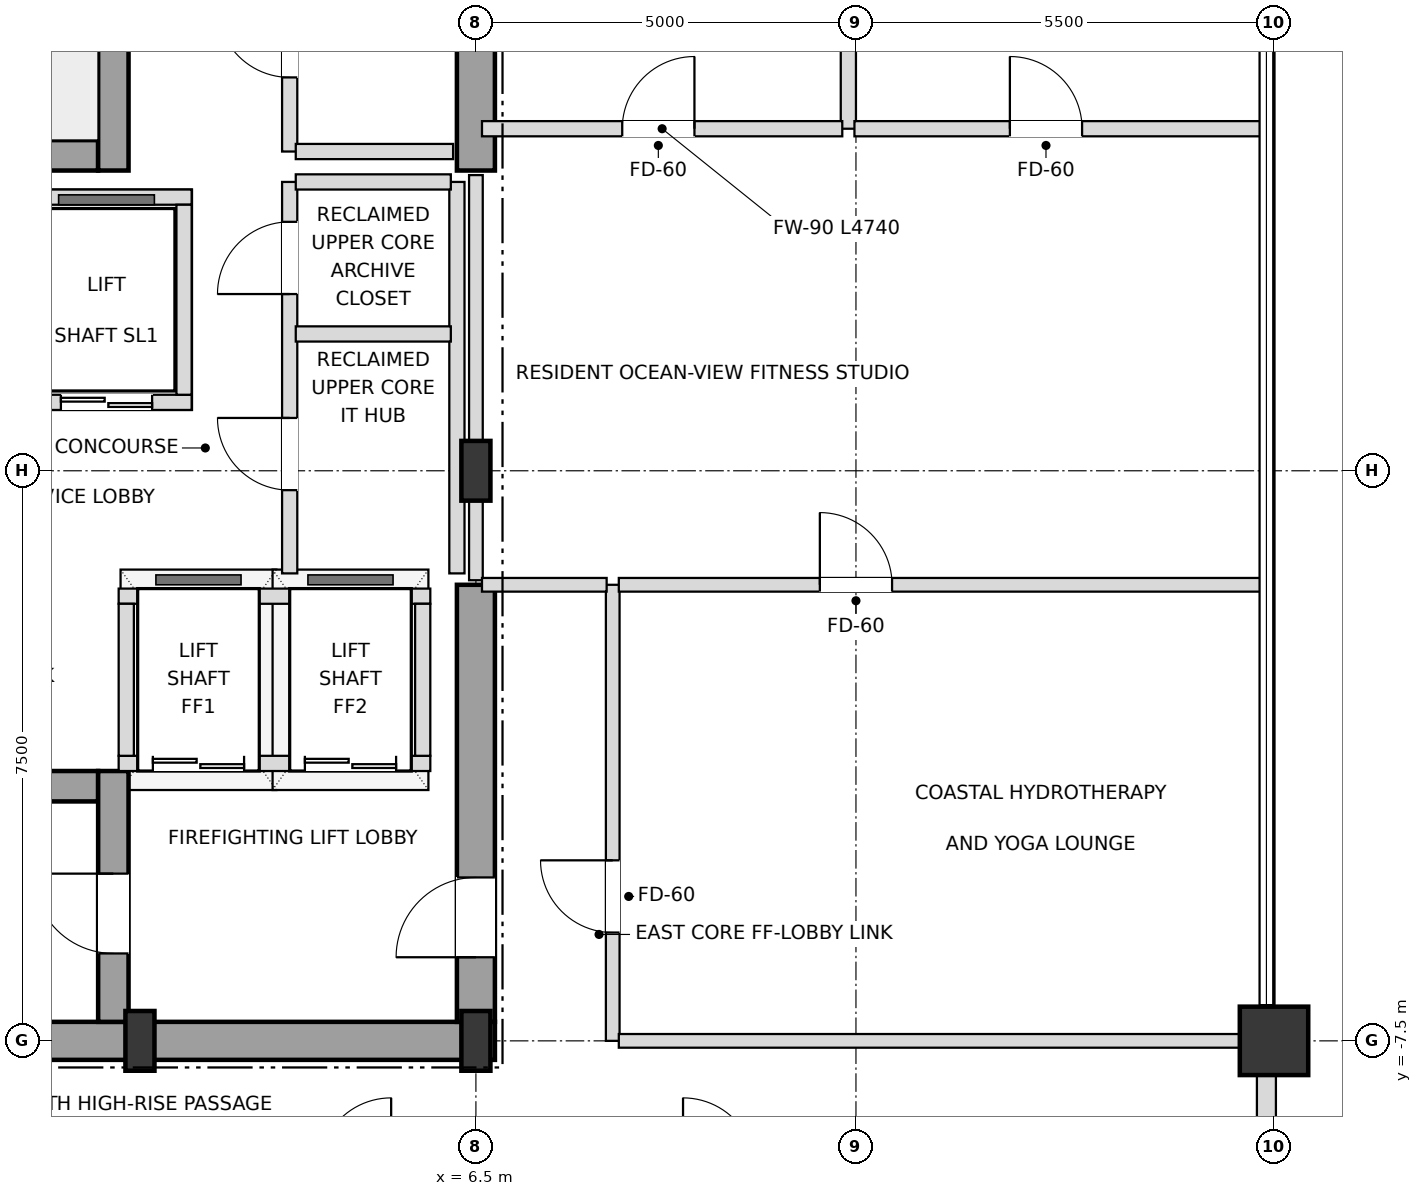
"""IFC4 building model, lengths in metres.
Left out: names, types, materials, properties, quantities, classifications, styles, units other than length and angle.
Written with IfcOpenShell. Run it as: python <this file> out.ifc"""

import sys

from ifc_helpers import new_model, si_unit, direction, frame, frame_2d, origin, origin_2d, place, context, subcontext, project, spatial, rectangle, i_section, extrude, element, fill, save


model = new_model("IFC4")
c1 = context("Model", 3, precision=1e-05, world=origin(), true_north=direction((0.0, 1.0)))
c2 = subcontext(c1, "Body", "Model", "MODEL_VIEW")
j1 = project(units=[si_unit("LENGTHUNIT", "METRE"), si_unit("PLANEANGLEUNIT", "RADIAN")], contexts=[c1])
p1 = place(None, origin())
s1 = spatial("IfcSite", under=j1, at=p1, CompositionType="ELEMENT")
p2 = place(p1, origin())
s2 = spatial("IfcBuilding", under=s1, at=p2, CompositionType="ELEMENT")
p3 = place(p2, frame((0.0, 0.0, 258.3)))
s3 = spatial("IfcBuildingStorey", under=s2, at=p3, CompositionType="ELEMENT", Elevation=258.3)
for number, where, z_axis, x_axis in (
    (1, (2.08, -7.5, 0.0), (0.0, 0.0, 1.0), (1.0, 0.0, 0.0)),
    (2, (6.5, -7.5, 0.0), (0.0, 0.0, 1.0), (1.0, 0.0, 0.0)),
    (3, (6.5, 0.0, 0.0), (0.0, 0.0, 1.0), (1.0, 0.0, 0.0)),
):
    element("IfcColumn", number, at=place(p3, frame(where, z_axis=z_axis, x_axis=x_axis)), inside=s3, PredefinedType="COLUMN", context=c2, shape_type="SweptSolid", body=[
        extrude(i_section(OverallWidth=0.382, OverallDepth=0.786, WebThickness=0.02, FlangeThickness=0.033, at=origin_2d()), origin(), (0.0, 0.0, 1.0), 3.6),
    ])
p4 = place(p3, frame((17.0, -7.5, 0.0), z_axis=(0.0, 0.0, 1.0), x_axis=(1.0, 0.0, 0.0)))
e4 = element("IfcColumn", 4, at=p4, inside=s3, PredefinedType="USERDEFINED", context=c2, shape_type="SweptSolid", body=[
    extrude(rectangle(XDim=0.9, YDim=0.9, at=origin_2d()), origin(), (0.0, 0.0, 1.0), 3.6),
])
p5 = place(p3, frame((16.9, -12.555, 0.0), z_axis=(0.0, 0.0, 1.0), x_axis=(0.0, 1.0, 0.0)))
e5 = element("IfcWall", 5, at=p5, inside=s3, PredefinedType="SOLIDWALL", context=c2, shape_type="SweptSolid", body=[
    extrude(rectangle(XDim=4.61, YDim=0.25, at=frame_2d((2.305, 0.0))), origin(), (0.0, 0.0, 1.0), 2.748),
])
p6 = place(p5, frame((1.405, 0.0, 0.72)))
e6 = element("IfcOpeningElement", 6, at=p6, cuts=e5, PredefinedType="OPENING", context=c2, shape_type="SweptSolid", body=[
    extrude(rectangle(XDim=1.8, YDim=1.68, at=frame_2d((0.9, 0.84))), frame((0.0, 0.135, 0.0), z_axis=(0.0, -1.0, 0.0), x_axis=(1.0, 0.0, 0.0)), (0.0, 0.0, 1.0), 0.27),
])
p7 = place(p3, frame((0.0, -7.5, 0.0), z_axis=(0.0, 0.0, 1.0), x_axis=(1.0, 0.0, 0.0)))
e7 = element("IfcWall", 7, at=p7, inside=s3, PredefinedType="SHEAR", context=c2, shape_type="SweptSolid", body=[
    extrude(rectangle(XDim=6.75, YDim=0.5, at=frame_2d((3.375, 0.0))), origin(), (0.0, 0.0, 1.0), 3.38),
])
p8 = place(p3, frame((6.5, -7.25, 0.0), z_axis=(0.0, 0.0, 1.0), x_axis=(0.0, 1.0, 0.0)))
e8 = element("IfcWall", 8, at=p8, inside=s3, PredefinedType="SHEAR", context=c2, shape_type="SweptSolid", body=[
    extrude(rectangle(XDim=5.75, YDim=0.5, at=frame_2d((2.875, 0.0))), origin(), (0.0, 0.0, 1.0), 3.38),
])
p9 = place(p8, frame((0.85, 0.0, 0.0)))
e9 = element("IfcOpeningElement", 9, at=p9, cuts=e8, PredefinedType="OPENING", context=c2, shape_type="SweptSolid", body=[
    extrude(rectangle(XDim=1.05, YDim=2.15, at=frame_2d((0.525, 1.075))), frame((0.0, 0.26, 0.0), z_axis=(0.0, -1.0, 0.0), x_axis=(1.0, 0.0, 0.0)), (0.0, 0.0, 1.0), 0.52),
])
p10 = place(p3, frame((6.5, 3.95, 0.0), z_axis=(0.0, 0.0, 1.0), x_axis=(0.0, 1.0, 0.0)))
e10 = element("IfcWall", 10, at=p10, inside=s3, PredefinedType="SHEAR", context=c2, shape_type="SweptSolid", body=[
    extrude(rectangle(XDim=3.3, YDim=0.5, at=frame_2d((1.65, 0.0))), origin(), (0.0, 0.0, 1.0), 3.38),
])
p11 = place(p3, frame((-6.25, -4.15, 0.0), z_axis=(0.0, 0.0, 1.0), x_axis=(1.0, 0.0, 0.0)))
e11 = element("IfcWall", 11, at=p11, inside=s3, PredefinedType="SHEAR", context=c2, shape_type="SweptSolid", body=[
    extrude(rectangle(XDim=7.78, YDim=0.4, at=frame_2d((3.89, 0.0))), origin(), (0.0, 0.0, 1.0), 3.38),
])
p12 = place(p3, frame((1.73, -7.25, 0.0), z_axis=(0.0, 0.0, 1.0), x_axis=(0.0, 1.0, 0.0)))
e12 = element("IfcWall", 12, at=p12, inside=s3, PredefinedType="SHEAR", context=c2, shape_type="SweptSolid", body=[
    extrude(rectangle(XDim=3.3, YDim=0.4, at=frame_2d((1.65, 0.0))), origin(), (0.0, 0.0, 1.0), 3.38),
])
p13 = place(p12, frame((0.9, 0.0, 0.0)))
e13 = element("IfcOpeningElement", 13, at=p13, cuts=e12, PredefinedType="OPENING", context=c2, shape_type="SweptSolid", body=[
    extrude(rectangle(XDim=1.05, YDim=2.15, at=frame_2d((0.525, 1.075))), frame((0.0, 0.21, 0.0), z_axis=(0.0, -1.0, 0.0), x_axis=(1.0, 0.0, 0.0)), (0.0, 0.0, 1.0), 0.42),
])
p14 = place(p3, frame((-5.55, 4.15, 0.0), z_axis=(0.0, 0.0, 1.0), x_axis=(1.0, 0.0, 0.0)))
e14 = element("IfcWall", 14, at=p14, inside=s3, PredefinedType="SHEAR", context=c2, shape_type="SweptSolid", body=[
    extrude(rectangle(XDim=7.08, YDim=0.4, at=frame_2d((3.54, 0.0))), origin(), (0.0, 0.0, 1.0), 3.38),
])
p15 = place(p3, frame((1.73, 3.95, 0.0), z_axis=(0.0, 0.0, 1.0), x_axis=(0.0, 1.0, 0.0)))
e15 = element("IfcWall", 15, at=p15, inside=s3, PredefinedType="SHEAR", context=c2, shape_type="SweptSolid", body=[
    extrude(rectangle(XDim=3.3, YDim=0.4, at=frame_2d((1.65, 0.0))), origin(), (0.0, 0.0, 1.0), 3.38),
])
p16 = place(p3, frame((-2.82, 0.9, 0.0), z_axis=(0.0, 0.0, 1.0), x_axis=(1.0, 0.0, 0.0)))
e16 = element("IfcWall", 16, at=p16, inside=s3, PredefinedType="SOLIDWALL", context=c2, shape_type="SweptSolid", body=[
    extrude(rectangle(XDim=5.58, YDim=0.2, at=frame_2d((2.79, 0.0))), origin(), (0.0, 0.0, 1.0), 3.38),
])
p17 = place(p16, frame((0.49, 0.0, 0.0)))
e17 = element("IfcOpeningElement", 17, at=p17, cuts=e16, PredefinedType="OPENING", context=c2, shape_type="SweptSolid", body=[
    extrude(rectangle(XDim=1.1, YDim=2.15, at=frame_2d((0.55, 1.075))), frame((0.0, 0.11, 0.0), z_axis=(0.0, -1.0, 0.0), x_axis=(1.0, 0.0, 0.0)), (0.0, 0.0, 1.0), 0.22),
])
p18 = place(p16, frame((2.17, 0.0, 0.0)))
e18 = element("IfcOpeningElement", 18, at=p18, cuts=e16, PredefinedType="OPENING", context=c2, shape_type="SweptSolid", body=[
    extrude(rectangle(XDim=1.1, YDim=2.15, at=frame_2d((0.55, 1.075))), frame((0.0, 0.11, 0.0), z_axis=(0.0, -1.0, 0.0), x_axis=(1.0, 0.0, 0.0)), (0.0, 0.0, 1.0), 0.22),
])
p19 = place(p16, frame((3.86, 0.0, 0.0)))
e19 = element("IfcOpeningElement", 19, at=p19, cuts=e16, PredefinedType="OPENING", context=c2, shape_type="SweptSolid", body=[
    extrude(rectangle(XDim=1.2, YDim=2.2, at=frame_2d((0.6, 1.1))), frame((0.0, 0.11, 0.0), z_axis=(0.0, -1.0, 0.0), x_axis=(1.0, 0.0, 0.0)), (0.0, 0.0, 1.0), 0.22),
])
p20 = place(p3, frame((-2.82, 3.6, 0.0), z_axis=(0.0, 0.0, 1.0), x_axis=(1.0, 0.0, 0.0)))
e20 = element("IfcWall", 20, at=p20, inside=s3, PredefinedType="SOLIDWALL", context=c2, shape_type="SweptSolid", body=[
    extrude(rectangle(XDim=5.58, YDim=0.2, at=frame_2d((2.79, 0.0))), origin(), (0.0, 0.0, 1.0), 3.38),
])
p21 = place(p3, frame((2.66, 1.0, 0.0), z_axis=(0.0, 0.0, 1.0), x_axis=(0.0, 1.0, 0.0)))
e21 = element("IfcWall", 21, at=p21, inside=s3, PredefinedType="SOLIDWALL", context=c2, shape_type="SweptSolid", body=[
    extrude(rectangle(XDim=2.5, YDim=0.2, at=frame_2d((1.25, 0.0))), origin(), (0.0, 0.0, 1.0), 3.38),
])
p22 = place(p3, frame((1.8, -3.85, 0.0), z_axis=(0.0, 0.0, 1.0), x_axis=(1.0, 0.0, 0.0)))
e22 = element("IfcWall", 22, at=p22, inside=s3, PredefinedType="SOLIDWALL", context=c2, shape_type="SweptSolid", body=[
    extrude(rectangle(XDim=4.1, YDim=0.2, at=frame_2d((2.05, 0.0))), origin(), (0.0, 0.0, 1.0), 3.38),
])
p23 = place(p22, frame((0.45, 0.0, 0.0)))
e23 = element("IfcOpeningElement", 23, at=p23, cuts=e22, PredefinedType="OPENING", context=c2, shape_type="SweptSolid", body=[
    extrude(rectangle(XDim=1.2, YDim=2.2, at=frame_2d((0.6, 1.1))), frame((0.0, 0.11, 0.0), z_axis=(0.0, -1.0, 0.0), x_axis=(1.0, 0.0, 0.0)), (0.0, 0.0, 1.0), 0.22),
])
p24 = place(p22, frame((2.45, 0.0, 0.0)))
e24 = element("IfcOpeningElement", 24, at=p24, cuts=e22, PredefinedType="OPENING", context=c2, shape_type="SweptSolid", body=[
    extrude(rectangle(XDim=1.2, YDim=2.2, at=frame_2d((0.6, 1.1))), frame((0.0, 0.11, 0.0), z_axis=(0.0, -1.0, 0.0), x_axis=(1.0, 0.0, 0.0)), (0.0, 0.0, 1.0), 0.22),
])
p25 = place(p3, frame((1.8, -1.65, 0.0), z_axis=(0.0, 0.0, 1.0), x_axis=(1.0, 0.0, 0.0)))
e25 = element("IfcWall", 25, at=p25, inside=s3, PredefinedType="SOLIDWALL", context=c2, shape_type="SweptSolid", body=[
    extrude(rectangle(XDim=4.1, YDim=0.2, at=frame_2d((2.05, 0.0))), origin(), (0.0, 0.0, 1.0), 3.38),
])
for number, where, z_axis, x_axis in (
    (26, (1.9, -3.75, 0.0), (0.0, 0.0, 1.0), (0.0, 1.0, 0.0)),
    (27, (5.8, -3.75, 0.0), (0.0, 0.0, 1.0), (0.0, 1.0, 0.0)),
):
    element("IfcWall", number, at=place(p3, frame(where, z_axis=z_axis, x_axis=x_axis)), inside=s3, PredefinedType="SOLIDWALL", context=c2, shape_type="SweptSolid", body=[
        extrude(rectangle(XDim=2.0, YDim=0.2, at=frame_2d((1.0, 0.0))), origin(), (0.0, 0.0, 1.0), 3.38),
    ])
p26 = place(p3, frame((4.05, -1.35, 0.0), z_axis=(0.0, 0.0, 1.0), x_axis=(0.0, 1.0, 0.0)))
e28 = element("IfcWall", 28, at=p26, inside=s3, PredefinedType="SOLIDWALL", context=c2, shape_type="SweptSolid", body=[
    extrude(rectangle(XDim=5.15, YDim=0.2, at=frame_2d((2.575, 0.0))), origin(), (0.0, 0.0, 1.0), 3.38),
])
p27 = place(p26, frame((1.095, 0.0, 0.0)))
e29 = element("IfcOpeningElement", 29, at=p27, cuts=e28, PredefinedType="OPENING", context=c2, shape_type="SweptSolid", body=[
    extrude(rectangle(XDim=0.95, YDim=2.15, at=frame_2d((0.475, 1.075))), frame((0.0, 0.11, 0.0), z_axis=(0.0, -1.0, 0.0), x_axis=(1.0, 0.0, 0.0)), (0.0, 0.0, 1.0), 0.22),
])
p28 = place(p26, frame((3.675, 0.0, 0.0)))
e30 = element("IfcOpeningElement", 30, at=p28, cuts=e28, PredefinedType="OPENING", context=c2, shape_type="SweptSolid", body=[
    extrude(rectangle(XDim=0.95, YDim=2.15, at=frame_2d((0.475, 1.075))), frame((0.0, 0.11, 0.0), z_axis=(0.0, -1.0, 0.0), x_axis=(1.0, 0.0, 0.0)), (0.0, 0.0, 1.0), 0.22),
])
p29 = place(p3, frame((4.05, 4.2, 0.0), z_axis=(0.0, 0.0, 1.0), x_axis=(0.0, 1.0, 0.0)))
e31 = element("IfcWall", 31, at=p29, inside=s3, PredefinedType="SOLIDWALL", context=c2, shape_type="SweptSolid", body=[
    extrude(rectangle(XDim=3.05, YDim=0.2, at=frame_2d((1.525, 0.0))), origin(), (0.0, 0.0, 1.0), 3.38),
])
p30 = place(p29, frame((0.975, 0.0, 0.0)))
e32 = element("IfcOpeningElement", 32, at=p30, cuts=e31, PredefinedType="OPENING", context=c2, shape_type="SweptSolid", body=[
    extrude(rectangle(XDim=0.95, YDim=2.15, at=frame_2d((0.475, 1.075))), frame((0.0, 0.11, 0.0), z_axis=(0.0, -1.0, 0.0), x_axis=(1.0, 0.0, 0.0)), (0.0, 0.0, 1.0), 0.22),
])
p31 = place(p3, frame((6.25, -1.35, 0.0), z_axis=(0.0, 0.0, 1.0), x_axis=(0.0, 1.0, 0.0)))
e33 = element("IfcWall", 33, at=p31, inside=s3, PredefinedType="SOLIDWALL", context=c2, shape_type="SweptSolid", body=[
    extrude(rectangle(XDim=5.15, YDim=0.2, at=frame_2d((2.575, 0.0))), origin(), (0.0, 0.0, 1.0), 3.38),
])
p32 = place(p3, frame((6.5, -1.44, 0.0), z_axis=(0.0, 0.0, 1.0), x_axis=(0.0, 1.0, 0.0)))
e34 = element("IfcWall", 34, at=p32, inside=s3, PredefinedType="PARTITIONING", context=c2, shape_type="SweptSolid", body=[
    extrude(rectangle(XDim=5.33, YDim=0.18, at=frame_2d((2.665, 0.0))), origin(), (0.0, 0.0, 1.0), 2.826),
])
p33 = place(p3, frame((8.3, -7.5, 0.0), z_axis=(0.0, 0.0, 1.0), x_axis=(0.0, 1.0, 0.0)))
e35 = element("IfcWall", 35, at=p33, inside=s3, PredefinedType="PARTITIONING", context=c2, shape_type="SweptSolid", body=[
    extrude(rectangle(XDim=6.0, YDim=0.18, at=frame_2d((3.0, 0.0))), origin(), (0.0, 0.0, 1.0), 3.38),
])
p34 = place(p33, frame((1.425, 0.0, 0.0)))
e36 = element("IfcOpeningElement", 36, at=p34, cuts=e35, PredefinedType="OPENING", context=c2, shape_type="SweptSolid", body=[
    extrude(rectangle(XDim=0.95, YDim=2.15, at=frame_2d((0.475, 1.075))), frame((0.0, 0.1, 0.0), z_axis=(0.0, -1.0, 0.0), x_axis=(1.0, 0.0, 0.0)), (0.0, 0.0, 1.0), 0.2),
])
p35 = place(p3, frame((11.4, 4.5, 0.0), z_axis=(0.0, 0.0, 1.0), x_axis=(0.0, 1.0, 0.0)))
e37 = element("IfcWall", 37, at=p35, inside=s3, PredefinedType="SOLIDWALL", context=c2, shape_type="SweptSolid", body=[
    extrude(rectangle(XDim=3.0, YDim=0.2, at=frame_2d((1.5, 0.0))), origin(), (0.0, 0.0, 1.0), 3.018),
])
p36 = place(p3, frame((8.38, -7.5, 0.0), z_axis=(0.0, 0.0, 1.0), x_axis=(1.0, 0.0, 0.0)))
e38 = element("IfcWall", 38, at=p36, inside=s3, PredefinedType="PARTITIONING", context=c2, shape_type="SweptSolid", body=[
    extrude(rectangle(XDim=8.52, YDim=0.18, at=frame_2d((4.26, 0.0))), origin(), (0.0, 0.0, 1.0), 2.826),
])
p37 = place(p3, frame((6.58, -1.5, 0.0), z_axis=(0.0, 0.0, 1.0), x_axis=(1.0, 0.0, 0.0)))
e39 = element("IfcWall", 39, at=p37, inside=s3, PredefinedType="PARTITIONING", context=c2, shape_type="SweptSolid", body=[
    extrude(rectangle(XDim=1.64, YDim=0.18, at=frame_2d((0.82, 0.0))), origin(), (0.0, 0.0, 1.0), 3.38),
])
p38 = place(p3, frame((8.38, -1.5, 0.0), z_axis=(0.0, 0.0, 1.0), x_axis=(1.0, 0.0, 0.0)))
e40 = element("IfcWall", 40, at=p38, inside=s3, PredefinedType="PARTITIONING", context=c2, shape_type="SweptSolid", body=[
    extrude(rectangle(XDim=8.44, YDim=0.18, at=frame_2d((4.22, 0.0))), origin(), (0.0, 0.0, 1.0), 3.018),
])
p39 = place(p38, frame((2.645, 0.0, 0.0)))
e41 = element("IfcOpeningElement", 41, at=p39, cuts=e40, PredefinedType="OPENING", context=c2, shape_type="SweptSolid", body=[
    extrude(rectangle(XDim=0.95, YDim=2.15, at=frame_2d((0.475, 1.075))), frame((0.0, 0.1, 0.0), z_axis=(0.0, -1.0, 0.0), x_axis=(1.0, 0.0, 0.0)), (0.0, 0.0, 1.0), 0.2),
])
for number, where, z_axis, x_axis in (
    (42, (4.13, 1.8, 0.0), (0.0, 0.0, 1.0), (1.0, 0.0, 0.0)),
    (43, (4.13, 3.8, 0.0), (0.0, 0.0, 1.0), (1.0, 0.0, 0.0)),
):
    element("IfcWall", number, at=place(p3, frame(where, z_axis=z_axis, x_axis=x_axis)), inside=s3, PredefinedType="SOLIDWALL", context=c2, shape_type="SweptSolid", body=[
        extrude(rectangle(XDim=2.04, YDim=0.2, at=frame_2d((1.02, 0.0))), origin(), (0.0, 0.0, 1.0), 3.38),
    ])
p40 = place(p3, frame((4.13, 4.2, 0.0), z_axis=(0.0, 0.0, 1.0), x_axis=(1.0, 0.0, 0.0)))
e44 = element("IfcWall", 44, at=p40, inside=s3, PredefinedType="SOLIDWALL", context=c2, shape_type="SweptSolid", body=[
    extrude(rectangle(XDim=2.07, YDim=0.2, at=frame_2d((1.035, 0.0))), origin(), (0.0, 0.0, 1.0), 3.38),
])
p41 = place(p3, frame((6.58, 4.5, 0.0), z_axis=(0.0, 0.0, 1.0), x_axis=(1.0, 0.0, 0.0)))
e45 = element("IfcWall", 45, at=p41, inside=s3, PredefinedType="SOLIDWALL", context=c2, shape_type="SweptSolid", body=[
    extrude(rectangle(XDim=4.74, YDim=0.2, at=frame_2d((2.37, 0.0))), origin(), (0.0, 0.0, 1.0), 3.38),
])
p42 = place(p41, frame((1.845, 0.0, 0.0)))
e46 = element("IfcOpeningElement", 46, at=p42, cuts=e45, PredefinedType="OPENING", context=c2, shape_type="SweptSolid", body=[
    extrude(rectangle(XDim=0.95, YDim=2.15, at=frame_2d((0.475, 1.075))), frame((0.0, 0.11, 0.0), z_axis=(0.0, -1.0, 0.0), x_axis=(1.0, 0.0, 0.0)), (0.0, 0.0, 1.0), 0.22),
])
p43 = place(p3, frame((11.48, 4.5, 0.0), z_axis=(0.0, 0.0, 1.0), x_axis=(1.0, 0.0, 0.0)))
e47 = element("IfcWall", 47, at=p43, inside=s3, PredefinedType="SOLIDWALL", context=c2, shape_type="SweptSolid", body=[
    extrude(rectangle(XDim=5.34, YDim=0.2, at=frame_2d((2.67, 0.0))), origin(), (0.0, 0.0, 1.0), 3.38),
])
p44 = place(p43, frame((2.045, 0.0, 0.0)))
e48 = element("IfcOpeningElement", 48, at=p44, cuts=e47, PredefinedType="OPENING", context=c2, shape_type="SweptSolid", body=[
    extrude(rectangle(XDim=0.95, YDim=2.15, at=frame_2d((0.475, 1.075))), frame((0.0, 0.11, 0.0), z_axis=(0.0, -1.0, 0.0), x_axis=(1.0, 0.0, 0.0)), (0.0, 0.0, 1.0), 0.22),
])
p45 = place(p9, origin())
e49 = element("IfcDoor", 49, at=p45, inside=s3, OperationType="SINGLE_SWING_LEFT", PredefinedType="DOOR", context=c2, shape_type="SweptSolid", body=[
    extrude(rectangle(XDim=1.05, YDim=2.15, at=frame_2d((0.525, 1.075))), frame((0.0, 0.025, 0.0), z_axis=(0.0, -1.0, 0.0), x_axis=(1.0, 0.0, 0.0)), (0.0, 0.0, 1.0), 0.05),
])
fill(e9, e49)
p46 = place(p13, origin())
e50 = element("IfcDoor", 50, at=p46, inside=s3, OperationType="SINGLE_SWING_RIGHT", PredefinedType="DOOR", context=c2, shape_type="SweptSolid", body=[
    extrude(rectangle(XDim=1.05, YDim=2.15, at=frame_2d((0.525, 1.075))), frame((0.0, 0.025, 0.0), z_axis=(0.0, -1.0, 0.0), x_axis=(1.0, 0.0, 0.0)), (0.0, 0.0, 1.0), 0.05),
])
fill(e13, e50)
p47 = place(p19, origin())
e51 = element("IfcDoor", 51, at=p47, inside=s3, OperationType="DOUBLE_DOOR_SLIDING", PredefinedType="DOOR", context=c2, shape_type="SweptSolid", body=[
    extrude(rectangle(XDim=1.2, YDim=2.2, at=frame_2d((0.6, 1.1))), frame((0.0, 0.025, 0.0), z_axis=(0.0, -1.0, 0.0), x_axis=(1.0, 0.0, 0.0)), (0.0, 0.0, 1.0), 0.05),
])
fill(e19, e51)
p48 = place(p23, origin())
e52 = element("IfcDoor", 52, at=p48, inside=s3, OperationType="DOUBLE_DOOR_SLIDING", PredefinedType="DOOR", context=c2, shape_type="SweptSolid", body=[
    extrude(rectangle(XDim=1.2, YDim=2.2, at=frame_2d((0.6, 1.1))), frame((0.0, 0.025, 0.0), z_axis=(0.0, -1.0, 0.0), x_axis=(1.0, 0.0, 0.0)), (0.0, 0.0, 1.0), 0.05),
])
fill(e23, e52)
p49 = place(p24, origin())
e53 = element("IfcDoor", 53, at=p49, inside=s3, OperationType="DOUBLE_DOOR_SLIDING", PredefinedType="DOOR", context=c2, shape_type="SweptSolid", body=[
    extrude(rectangle(XDim=1.2, YDim=2.2, at=frame_2d((0.6, 1.1))), frame((0.0, 0.025, 0.0), z_axis=(0.0, -1.0, 0.0), x_axis=(1.0, 0.0, 0.0)), (0.0, 0.0, 1.0), 0.05),
])
fill(e24, e53)
p50 = place(p27, origin())
e54 = element("IfcDoor", 54, at=p50, inside=s3, OperationType="SINGLE_SWING_RIGHT", PredefinedType="DOOR", context=c2, shape_type="SweptSolid", body=[
    extrude(rectangle(XDim=0.95, YDim=2.15, at=frame_2d((0.475, 1.075))), frame((0.0, 0.025, 0.0), z_axis=(0.0, -1.0, 0.0), x_axis=(1.0, 0.0, 0.0)), (0.0, 0.0, 1.0), 0.05),
])
fill(e29, e54)
p51 = place(p28, origin())
e55 = element("IfcDoor", 55, at=p51, inside=s3, OperationType="SINGLE_SWING_LEFT", PredefinedType="DOOR", context=c2, shape_type="SweptSolid", body=[
    extrude(rectangle(XDim=0.95, YDim=2.15, at=frame_2d((0.475, 1.075))), frame((0.0, 0.025, 0.0), z_axis=(0.0, -1.0, 0.0), x_axis=(1.0, 0.0, 0.0)), (0.0, 0.0, 1.0), 0.05),
])
fill(e30, e55)
p52 = place(p30, origin())
e56 = element("IfcDoor", 56, at=p52, inside=s3, OperationType="SINGLE_SWING_RIGHT", PredefinedType="DOOR", context=c2, shape_type="SweptSolid", body=[
    extrude(rectangle(XDim=0.95, YDim=2.15, at=frame_2d((0.475, 1.075))), frame((0.0, 0.025, 0.0), z_axis=(0.0, -1.0, 0.0), x_axis=(1.0, 0.0, 0.0)), (0.0, 0.0, 1.0), 0.05),
])
fill(e32, e56)
p53 = place(p34, origin())
e57 = element("IfcDoor", 57, at=p53, inside=s3, OperationType="SINGLE_SWING_RIGHT", PredefinedType="DOOR", context=c2, shape_type="SweptSolid", body=[
    extrude(rectangle(XDim=0.95, YDim=2.15, at=frame_2d((0.475, 1.075))), frame((0.0, 0.025, 0.0), z_axis=(0.0, -1.0, 0.0), x_axis=(1.0, 0.0, 0.0)), (0.0, 0.0, 1.0), 0.05),
])
fill(e36, e57)
p54 = place(p39, origin())
e58 = element("IfcDoor", 58, at=p54, inside=s3, OperationType="SINGLE_SWING_LEFT", PredefinedType="DOOR", context=c2, shape_type="SweptSolid", body=[
    extrude(rectangle(XDim=0.95, YDim=2.15, at=frame_2d((0.475, 1.075))), frame((0.0, 0.025, 0.0), z_axis=(0.0, -1.0, 0.0), x_axis=(1.0, 0.0, 0.0)), (0.0, 0.0, 1.0), 0.05),
])
fill(e41, e58)
p55 = place(p42, origin())
e59 = element("IfcDoor", 59, at=p55, inside=s3, OperationType="SINGLE_SWING_RIGHT", PredefinedType="DOOR", context=c2, shape_type="SweptSolid", body=[
    extrude(rectangle(XDim=0.95, YDim=2.15, at=frame_2d((0.475, 1.075))), frame((0.0, 0.025, 0.0), z_axis=(0.0, -1.0, 0.0), x_axis=(1.0, 0.0, 0.0)), (0.0, 0.0, 1.0), 0.05),
])
fill(e46, e59)
p56 = place(p44, origin())
e60 = element("IfcDoor", 60, at=p56, inside=s3, OperationType="SINGLE_SWING_LEFT", PredefinedType="DOOR", context=c2, shape_type="SweptSolid", body=[
    extrude(rectangle(XDim=0.95, YDim=2.15, at=frame_2d((0.475, 1.075))), frame((0.0, 0.025, 0.0), z_axis=(0.0, -1.0, 0.0), x_axis=(1.0, 0.0, 0.0)), (0.0, 0.0, 1.0), 0.05),
])
fill(e48, e60)
save(model, sys.argv[1])
